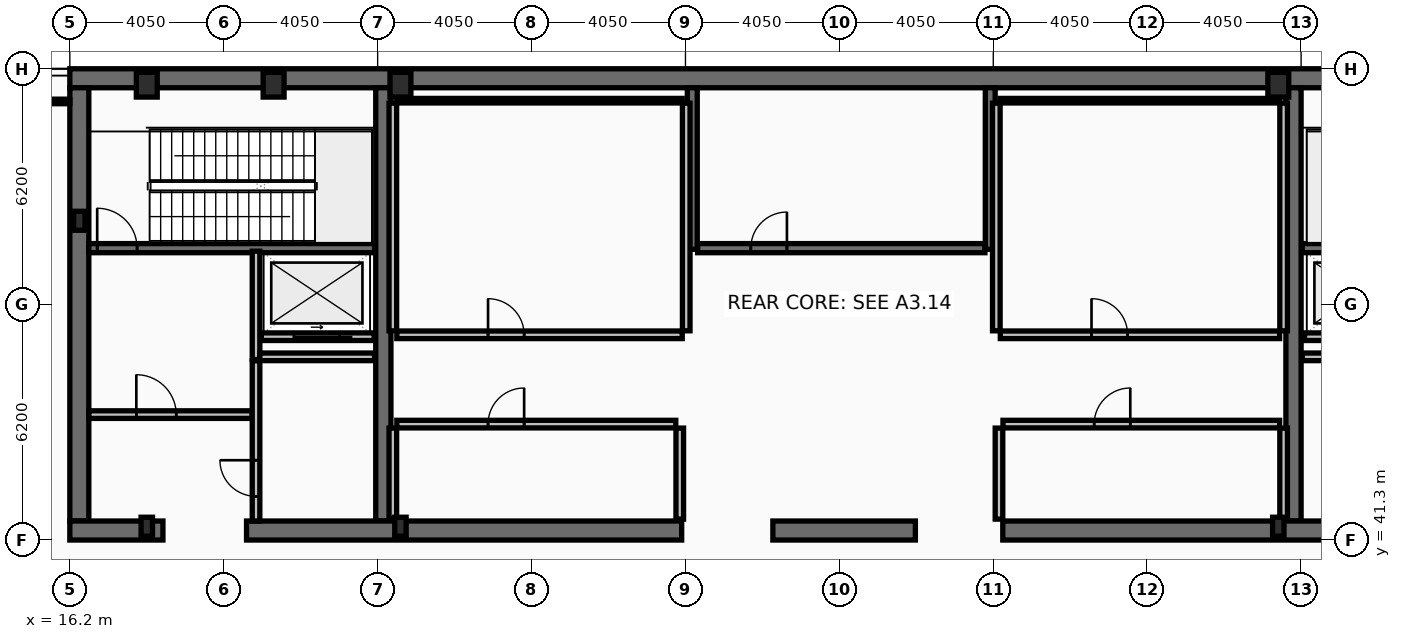
"""IFC4 building model, lengths in metres.
Left out: names, types, materials, properties, quantities, classifications, styles, units other than length and angle.
Written with IfcOpenShell. Run it as: python <this file> out.ifc"""

import sys

from ifc_helpers import new_model, si_unit, direction, frame, frame_2d, origin, origin_2d, place, context, subcontext, project, spatial, rectangle, hollow_rectangle, i_section, extrude, element, fill, save


model = new_model("IFC4")
c1 = context("Model", 3, precision=1e-05, world=origin(), true_north=direction((0.0, 1.0)))
c2 = subcontext(c1, "Body", "Model", "MODEL_VIEW")
j1 = project(units=[si_unit("LENGTHUNIT", "METRE"), si_unit("PLANEANGLEUNIT", "RADIAN")], contexts=[c1])
p1 = place(None, origin())
s1 = spatial("IfcSite", under=j1, at=p1, CompositionType="ELEMENT")
p2 = place(p1, origin())
s2 = spatial("IfcBuilding", under=s1, at=p2, CompositionType="ELEMENT")
p3 = place(p2, frame((0.0, 0.0, 367.4)))
s3 = spatial("IfcBuildingStorey", under=s2, at=p3, CompositionType="ELEMENT", Elevation=367.4)
p4 = place(p3, frame((16.2, 53.45, 0.0), z_axis=(0.0, 0.0, 1.0), x_axis=(1.0, 0.0, 0.0)))
e1 = element("IfcWall", 1, at=p4, inside=s3, PredefinedType="SHEAR", context=c2, shape_type="SweptSolid", body=[
    extrude(rectangle(XDim=40.5, YDim=0.5, at=frame_2d((20.25, 0.0))), origin(), (0.0, 0.0, 1.0), 5.4),
])
p5 = place(p3, frame((16.45, 41.8, 0.0), z_axis=(0.0, 0.0, 1.0), x_axis=(0.0, 1.0, 0.0)))
e2 = element("IfcWall", 2, at=p5, inside=s3, PredefinedType="SHEAR", context=c2, shape_type="SweptSolid", body=[
    extrude(rectangle(XDim=11.4, YDim=0.5, at=frame_2d((5.7, 0.0))), origin(), (0.0, 0.0, 1.0), 5.4),
])
for number, where, z_axis, x_axis in (
    (3, (24.45, 41.8, 0.0), (0.0, 0.0, 1.0), (0.0, 1.0, 0.0)),
    (4, (48.4, 41.8, 0.0), (0.0, 0.0, 1.0), (0.0, 1.0, 0.0)),
):
    element("IfcWall", number, at=place(p3, frame(where, z_axis=z_axis, x_axis=x_axis)), inside=s3, PredefinedType="SHEAR", context=c2, shape_type="SweptSolid", body=[
        extrude(rectangle(XDim=11.4, YDim=0.4, at=frame_2d((5.7, 0.0))), origin(), (0.0, 0.0, 1.0), 5.4),
    ])
p6 = place(p3, frame((18.65, 41.55, 0.0), z_axis=(0.0, 0.0, 1.0), x_axis=(-1.0, 0.0, 0.0)))
e5 = element("IfcWall", 5, at=p6, inside=s3, PredefinedType="SHEAR", context=c2, shape_type="SweptSolid", body=[
    extrude(rectangle(XDim=2.45, YDim=0.5, at=frame_2d((1.225, 0.0))), origin(), (0.0, 0.0, 1.0), 5.4),
])
p7 = place(p3, frame((32.3, 41.55, 0.0), z_axis=(0.0, 0.0, 1.0), x_axis=(-1.0, 0.0, 0.0)))
e6 = element("IfcWall", 6, at=p7, inside=s3, PredefinedType="SHEAR", context=c2, shape_type="SweptSolid", body=[
    extrude(rectangle(XDim=11.45, YDim=0.5, at=frame_2d((5.725, 0.0))), origin(), (0.0, 0.0, 1.0), 5.4),
])
p8 = place(p3, frame((38.45, 41.55, 0.0), z_axis=(0.0, 0.0, 1.0), x_axis=(-1.0, 0.0, 0.0)))
e7 = element("IfcWall", 7, at=p8, inside=s3, PredefinedType="SHEAR", context=c2, shape_type="SweptSolid", body=[
    extrude(rectangle(XDim=3.75, YDim=0.5, at=frame_2d((1.875, 0.0))), origin(), (0.0, 0.0, 1.0), 5.4),
])
p9 = place(p3, frame((52.05, 41.55, 0.0), z_axis=(0.0, 0.0, 1.0), x_axis=(-1.0, 0.0, 0.0)))
e8 = element("IfcWall", 8, at=p9, inside=s3, PredefinedType="SHEAR", context=c2, shape_type="SweptSolid", body=[
    extrude(rectangle(XDim=11.3, YDim=0.5, at=frame_2d((5.65, 0.0))), origin(), (0.0, 0.0, 1.0), 5.4),
])
for number, where, z_axis, x_axis in (
    (9, (32.58, 48.95, 0.0), (0.0, 0.0, 1.0), (0.0, 1.0, 0.0)),
    (10, (40.42, 48.95, 0.0), (0.0, 0.0, 1.0), (0.0, 1.0, 0.0)),
):
    element("IfcWall", number, at=place(p3, frame(where, z_axis=z_axis, x_axis=x_axis)), inside=s3, PredefinedType="SHEAR", context=c2, shape_type="SweptSolid", body=[
        extrude(rectangle(XDim=4.25, YDim=0.26, at=frame_2d((2.125, 0.0))), origin(), (0.0, 0.0, 1.0), 5.4),
    ])
p10 = place(p3, frame((16.7, 48.98, 0.0), z_axis=(0.0, 0.0, 1.0), x_axis=(1.0, 0.0, 0.0)))
e11 = element("IfcWall", 11, at=p10, inside=s3, PredefinedType="SHEAR", context=c2, shape_type="SweptSolid", body=[
    extrude(rectangle(XDim=7.52, YDim=0.24, at=frame_2d((3.76, 0.0))), origin(), (0.0, 0.0, 1.0), 5.4),
])
p11 = place(p10, frame((0.22, 0.0, 0.0)))
e12 = element("IfcOpeningElement", 12, at=p11, cuts=e11, PredefinedType="OPENING", context=c2, shape_type="SweptSolid", body=[
    extrude(rectangle(XDim=1.05, YDim=2.15, at=frame_2d((0.525, 1.075))), frame((0.0, 0.13, 0.0), z_axis=(0.0, -1.0, 0.0), x_axis=(1.0, 0.0, 0.0)), (0.0, 0.0, 1.0), 0.26),
])
p12 = place(p3, frame((48.63, 48.98, 0.0), z_axis=(0.0, 0.0, 1.0), x_axis=(1.0, 0.0, 0.0)))
e13 = element("IfcWall", 13, at=p12, inside=s3, PredefinedType="SHEAR", context=c2, shape_type="SweptSolid", body=[
    extrude(rectangle(XDim=7.57, YDim=0.24, at=frame_2d((3.785, 0.0))), origin(), (0.0, 0.0, 1.0), 5.4),
])
p13 = place(p12, frame((6.3, 0.0, 0.0)))
e14 = element("IfcOpeningElement", 14, at=p13, cuts=e13, PredefinedType="OPENING", context=c2, shape_type="SweptSolid", body=[
    extrude(rectangle(XDim=1.05, YDim=2.15, at=frame_2d((0.525, 1.075))), frame((0.0, 0.13, 0.0), z_axis=(0.0, -1.0, 0.0), x_axis=(1.0, 0.0, 0.0)), (0.0, 0.0, 1.0), 0.26),
])
p14 = place(p3, frame((32.72, 48.98, 0.0), z_axis=(0.0, 0.0, 1.0), x_axis=(1.0, 0.0, 0.0)))
e15 = element("IfcWall", 15, at=p14, inside=s3, PredefinedType="SHEAR", context=c2, shape_type="SweptSolid", body=[
    extrude(rectangle(XDim=7.56, YDim=0.24, at=frame_2d((3.78, 0.0))), origin(), (0.0, 0.0, 1.0), 5.4),
])
p15 = place(p14, frame((1.4, 0.0, 0.0)))
e16 = element("IfcOpeningElement", 16, at=p15, cuts=e15, PredefinedType="OPENING", context=c2, shape_type="SweptSolid", body=[
    extrude(rectangle(XDim=0.95, YDim=2.1, at=frame_2d((0.475, 1.05))), frame((0.0, 0.13, 0.0), z_axis=(0.0, -1.0, 0.0), x_axis=(1.0, 0.0, 0.0)), (0.0, 0.0, 1.0), 0.26),
])
for number, where, z_axis, x_axis in (
    (17, (18.225, 53.28, 0.0), (0.0, 0.0, 1.0), (1.0, 0.0, 0.0)),
    (18, (21.562, 53.28, 0.0), (0.0, 0.0, 1.0), (1.0, 0.0, 0.0)),
    (19, (24.9, 53.28, 0.0), (0.0, 0.0, 1.0), (1.0, 0.0, 0.0)),
    (20, (48.0, 53.28, 0.0), (0.0, 0.0, 1.0), (1.0, 0.0, 0.0)),
):
    element("IfcColumn", number, at=place(p3, frame(where, z_axis=z_axis, x_axis=x_axis)), inside=s3, PredefinedType="COLUMN", context=c2, shape_type="SweptSolid", body=[
        extrude(hollow_rectangle(XDim=0.55, YDim=0.65, WallThickness=0.04, at=origin_2d()), origin(), (0.0, 0.0, 1.0), 5.6),
    ])
for number, where, z_axis, x_axis in (
    (21, (16.45, 49.7, 0.0), (0.0, 0.0, 1.0), (1.0, 0.0, 0.0)),
    (22, (18.225, 41.65, 0.0), (0.0, 0.0, 1.0), (1.0, 0.0, 0.0)),
    (23, (24.9, 41.65, 0.0), (0.0, 0.0, 1.0), (1.0, 0.0, 0.0)),
    (24, (48.0, 41.65, 0.0), (0.0, 0.0, 1.0), (1.0, 0.0, 0.0)),
):
    element("IfcColumn", number, at=place(p3, frame(where, z_axis=z_axis, x_axis=x_axis)), inside=s3, PredefinedType="COLUMN", context=c2, shape_type="SweptSolid", body=[
        extrude(i_section(OverallWidth=0.3, OverallDepth=0.5, WebThickness=0.014, FlangeThickness=0.028, at=origin_2d()), origin(), (0.0, 0.0, 1.0), 5.6),
    ])
p16 = place(p3, frame((51.61, 46.65, 0.0), z_axis=(0.0, 0.0, 1.0), x_axis=(-1.0, 0.0, 0.0)))
e25 = element("IfcWall", 25, at=p16, inside=s3, PredefinedType="PARTITIONING", context=c2, shape_type="SweptSolid", body=[
    extrude(rectangle(XDim=2.92, YDim=0.2, at=frame_2d((1.46, 0.0))), origin(), (0.0, 0.0, 1.0), 5.4),
])
p17 = place(p16, frame((0.86, 0.0, 0.0)))
e26 = element("IfcOpeningElement", 26, at=p17, cuts=e25, PredefinedType="OPENING", context=c2, shape_type="SweptSolid", body=[
    extrude(rectangle(XDim=1.2, YDim=2.18, at=frame_2d((0.6, 1.09))), frame((0.0, 0.11, 0.0), z_axis=(0.0, -1.0, 0.0), x_axis=(1.0, 0.0, 0.0)), (0.0, 0.0, 1.0), 0.22),
])
p18 = place(p3, frame((24.21, 46.65, 0.0), z_axis=(0.0, 0.0, 1.0), x_axis=(-1.0, 0.0, 0.0)))
e27 = element("IfcWall", 27, at=p18, inside=s3, PredefinedType="PARTITIONING", context=c2, shape_type="SweptSolid", body=[
    extrude(rectangle(XDim=2.97, YDim=0.2, at=frame_2d((1.485, 0.0))), origin(), (0.0, 0.0, 1.0), 5.4),
])
p19 = place(p18, frame((0.91, 0.0, 0.0)))
e28 = element("IfcOpeningElement", 28, at=p19, cuts=e27, PredefinedType="OPENING", context=c2, shape_type="SweptSolid", body=[
    extrude(rectangle(XDim=1.2, YDim=2.18, at=frame_2d((0.6, 1.09))), frame((0.0, 0.11, 0.0), z_axis=(0.0, -1.0, 0.0), x_axis=(1.0, 0.0, 0.0)), (0.0, 0.0, 1.0), 0.22),
])
p20 = place(p3, frame((21.1, 46.05, 0.0), z_axis=(0.0, 0.0, 1.0), x_axis=(0.0, 1.0, 0.0)))
e29 = element("IfcWall", 29, at=p20, inside=s3, PredefinedType="PARTITIONING", context=c2, shape_type="SweptSolid", body=[
    extrude(rectangle(XDim=2.85, YDim=0.2, at=frame_2d((1.425, 0.0))), origin(), (0.0, 0.0, 1.0), 5.4),
])
p21 = place(p3, frame((16.7, 44.6, 0.0), z_axis=(0.0, 0.0, 1.0), x_axis=(1.0, 0.0, 0.0)))
e30 = element("IfcWall", 30, at=p21, inside=s3, PredefinedType="PARTITIONING", context=c2, shape_type="SweptSolid", body=[
    extrude(rectangle(XDim=4.3, YDim=0.2, at=frame_2d((2.15, 0.0))), origin(), (0.0, 0.0, 1.0), 5.4),
])
p22 = place(p21, frame((1.25, 0.0, 0.0)))
e31 = element("IfcOpeningElement", 31, at=p22, cuts=e30, PredefinedType="OPENING", context=c2, shape_type="SweptSolid", body=[
    extrude(rectangle(XDim=1.05, YDim=2.15, at=frame_2d((0.525, 1.075))), frame((0.0, 0.11, 0.0), z_axis=(0.0, -1.0, 0.0), x_axis=(1.0, 0.0, 0.0)), (0.0, 0.0, 1.0), 0.22),
])
p23 = place(p3, frame((21.2, 46.12, 0.0), z_axis=(0.0, 0.0, 1.0), x_axis=(1.0, 0.0, 0.0)))
e32 = element("IfcWall", 32, at=p23, inside=s3, PredefinedType="PARTITIONING", context=c2, shape_type="SweptSolid", body=[
    extrude(rectangle(XDim=3.02, YDim=0.2, at=frame_2d((1.51, 0.0))), origin(), (0.0, 0.0, 1.0), 5.4),
])
p24 = place(p3, frame((21.1, 41.8, 0.0), z_axis=(0.0, 0.0, 1.0), x_axis=(0.0, 1.0, 0.0)))
e33 = element("IfcWall", 33, at=p24, inside=s3, PredefinedType="PARTITIONING", context=c2, shape_type="SweptSolid", body=[
    extrude(rectangle(XDim=4.215, YDim=0.2, at=frame_2d((2.107, 0.0))), origin(), (0.0, 0.0, 1.0), 5.4),
])
p25 = place(p24, frame((0.65, 0.0, 0.0)))
e34 = element("IfcOpeningElement", 34, at=p25, cuts=e33, PredefinedType="OPENING", context=c2, shape_type="SweptSolid", body=[
    extrude(rectangle(XDim=0.95, YDim=2.1, at=frame_2d((0.475, 1.05))), frame((0.0, 0.11, 0.0), z_axis=(0.0, -1.0, 0.0), x_axis=(1.0, 0.0, 0.0)), (0.0, 0.0, 1.0), 0.22),
])
p26 = place(p3, frame((48.63, 46.12, 0.0), z_axis=(0.0, 0.0, 1.0), x_axis=(1.0, 0.0, 0.0)))
e35 = element("IfcWall", 35, at=p26, inside=s3, PredefinedType="PARTITIONING", context=c2, shape_type="SweptSolid", body=[
    extrude(rectangle(XDim=3.07, YDim=0.2, at=frame_2d((1.535, 0.0))), origin(), (0.0, 0.0, 1.0), 5.4),
])
for number, where, z_axis, x_axis in (
    (36, (24.7, 46.805, 0.0), (0.0, 0.0, 1.0), (0.0, 1.0, 0.0)),
    (37, (32.42, 46.805, 0.0), (0.0, 0.0, 1.0), (0.0, 1.0, 0.0)),
):
    element("IfcWall", number, at=place(p3, frame(where, z_axis=z_axis, x_axis=x_axis)), inside=s3, PredefinedType="PARTITIONING", context=c2, shape_type="SweptSolid", body=[
        extrude(rectangle(XDim=5.99, YDim=0.2, at=frame_2d((2.995, 0.0))), origin(), (0.0, 0.0, 1.0), 5.4),
    ])
p27 = place(p3, frame((24.805, 52.86, 0.0), z_axis=(0.0, 0.0, 1.0), x_axis=(1.0, 0.0, 0.0)))
e38 = element("IfcWall", 38, at=p27, inside=s3, PredefinedType="PARTITIONING", context=c2, shape_type="SweptSolid", body=[
    extrude(rectangle(XDim=7.51, YDim=0.12, at=frame_2d((3.755, 0.0))), origin(), (0.0, 0.0, 1.0), 5.4),
])
p28 = place(p3, frame((24.805, 46.7, 0.0), z_axis=(0.0, 0.0, 1.0), x_axis=(1.0, 0.0, 0.0)))
e39 = element("IfcWall", 39, at=p28, inside=s3, PredefinedType="PARTITIONING", context=c2, shape_type="SweptSolid", body=[
    extrude(rectangle(XDim=7.51, YDim=0.2, at=frame_2d((3.755, 0.0))), origin(), (0.0, 0.0, 1.0), 5.4),
])
p29 = place(p28, frame((2.4, 0.0, 0.0)))
e40 = element("IfcOpeningElement", 40, at=p29, cuts=e39, PredefinedType="OPENING", context=c2, shape_type="SweptSolid", body=[
    extrude(rectangle(XDim=0.95, YDim=2.1, at=frame_2d((0.475, 1.05))), frame((0.0, 0.11, 0.0), z_axis=(0.0, -1.0, 0.0), x_axis=(1.0, 0.0, 0.0)), (0.0, 0.0, 1.0), 0.22),
])
for number, where, z_axis, x_axis in (
    (41, (24.7, 41.85, 0.0), (0.0, 0.0, 1.0), (0.0, 1.0, 0.0)),
    (42, (32.25, 41.85, 0.0), (0.0, 0.0, 1.0), (0.0, 1.0, 0.0)),
):
    element("IfcWall", number, at=place(p3, frame(where, z_axis=z_axis, x_axis=x_axis)), inside=s3, PredefinedType="PARTITIONING", context=c2, shape_type="SweptSolid", body=[
        extrude(rectangle(XDim=2.395, YDim=0.2, at=frame_2d((1.198, 0.0))), origin(), (0.0, 0.0, 1.0), 5.4),
    ])
p30 = place(p3, frame((24.805, 44.35, 0.0), z_axis=(0.0, 0.0, 1.0), x_axis=(1.0, 0.0, 0.0)))
e43 = element("IfcWall", 43, at=p30, inside=s3, PredefinedType="PARTITIONING", context=c2, shape_type="SweptSolid", body=[
    extrude(rectangle(XDim=7.34, YDim=0.2, at=frame_2d((3.67, 0.0))), origin(), (0.0, 0.0, 1.0), 5.4),
])
p31 = place(p30, frame((2.4, 0.0, 0.0)))
e44 = element("IfcOpeningElement", 44, at=p31, cuts=e43, PredefinedType="OPENING", context=c2, shape_type="SweptSolid", body=[
    extrude(rectangle(XDim=0.95, YDim=2.1, at=frame_2d((0.475, 1.05))), frame((0.0, 0.11, 0.0), z_axis=(0.0, -1.0, 0.0), x_axis=(1.0, 0.0, 0.0)), (0.0, 0.0, 1.0), 0.22),
])
for number, where, z_axis, x_axis in (
    (45, (40.58, 46.805, 0.0), (0.0, 0.0, 1.0), (0.0, 1.0, 0.0)),
    (46, (48.14, 46.805, 0.0), (0.0, 0.0, 1.0), (0.0, 1.0, 0.0)),
):
    element("IfcWall", number, at=place(p3, frame(where, z_axis=z_axis, x_axis=x_axis)), inside=s3, PredefinedType="PARTITIONING", context=c2, shape_type="SweptSolid", body=[
        extrude(rectangle(XDim=5.99, YDim=0.2, at=frame_2d((2.995, 0.0))), origin(), (0.0, 0.0, 1.0), 5.4),
    ])
p32 = place(p3, frame((40.685, 52.86, 0.0), z_axis=(0.0, 0.0, 1.0), x_axis=(1.0, 0.0, 0.0)))
e47 = element("IfcWall", 47, at=p32, inside=s3, PredefinedType="PARTITIONING", context=c2, shape_type="SweptSolid", body=[
    extrude(rectangle(XDim=7.35, YDim=0.12, at=frame_2d((3.675, 0.0))), origin(), (0.0, 0.0, 1.0), 5.4),
])
p33 = place(p3, frame((40.685, 46.7, 0.0), z_axis=(0.0, 0.0, 1.0), x_axis=(1.0, 0.0, 0.0)))
e48 = element("IfcWall", 48, at=p33, inside=s3, PredefinedType="PARTITIONING", context=c2, shape_type="SweptSolid", body=[
    extrude(rectangle(XDim=7.35, YDim=0.2, at=frame_2d((3.675, 0.0))), origin(), (0.0, 0.0, 1.0), 5.4),
])
p34 = place(p33, frame((2.4, 0.0, 0.0)))
e49 = element("IfcOpeningElement", 49, at=p34, cuts=e48, PredefinedType="OPENING", context=c2, shape_type="SweptSolid", body=[
    extrude(rectangle(XDim=0.95, YDim=2.1, at=frame_2d((0.475, 1.05))), frame((0.0, 0.11, 0.0), z_axis=(0.0, -1.0, 0.0), x_axis=(1.0, 0.0, 0.0)), (0.0, 0.0, 1.0), 0.22),
])
for number, where, z_axis, x_axis in (
    (50, (40.65, 41.85, 0.0), (0.0, 0.0, 1.0), (0.0, 1.0, 0.0)),
    (51, (48.14, 41.85, 0.0), (0.0, 0.0, 1.0), (0.0, 1.0, 0.0)),
):
    element("IfcWall", number, at=place(p3, frame(where, z_axis=z_axis, x_axis=x_axis)), inside=s3, PredefinedType="PARTITIONING", context=c2, shape_type="SweptSolid", body=[
        extrude(rectangle(XDim=2.395, YDim=0.2, at=frame_2d((1.198, 0.0))), origin(), (0.0, 0.0, 1.0), 5.4),
    ])
p35 = place(p3, frame((40.755, 44.35, 0.0), z_axis=(0.0, 0.0, 1.0), x_axis=(1.0, 0.0, 0.0)))
e52 = element("IfcWall", 52, at=p35, inside=s3, PredefinedType="PARTITIONING", context=c2, shape_type="SweptSolid", body=[
    extrude(rectangle(XDim=7.28, YDim=0.2, at=frame_2d((3.64, 0.0))), origin(), (0.0, 0.0, 1.0), 5.4),
])
p36 = place(p35, frame((2.4, 0.0, 0.0)))
e53 = element("IfcOpeningElement", 53, at=p36, cuts=e52, PredefinedType="OPENING", context=c2, shape_type="SweptSolid", body=[
    extrude(rectangle(XDim=0.95, YDim=2.1, at=frame_2d((0.475, 1.05))), frame((0.0, 0.11, 0.0), z_axis=(0.0, -1.0, 0.0), x_axis=(1.0, 0.0, 0.0)), (0.0, 0.0, 1.0), 0.22),
])
p37 = place(p3, frame((12.095, 52.84, 0.0), z_axis=(0.0, 0.0, 1.0), x_axis=(1.0, 0.0, 0.0)))
e54 = element("IfcWall", 54, at=p37, inside=s3, PredefinedType="PARTITIONING", context=c2, shape_type="SweptSolid", body=[
    extrude(rectangle(XDim=4.105, YDim=0.12, at=frame_2d((2.052, 0.0))), origin(), (0.0, 0.0, 1.0), 5.4),
])
p38 = place(p11, origin())
e55 = element("IfcDoor", 55, at=p38, inside=s3, OperationType="SINGLE_SWING_LEFT", PredefinedType="DOOR", context=c2, shape_type="SweptSolid", body=[
    extrude(rectangle(XDim=1.05, YDim=2.15, at=frame_2d((0.525, 1.075))), frame((0.0, 0.025, 0.0), z_axis=(0.0, -1.0, 0.0), x_axis=(1.0, 0.0, 0.0)), (0.0, 0.0, 1.0), 0.05),
])
fill(e12, e55)
p39 = place(p15, origin())
e56 = element("IfcDoor", 56, at=p39, inside=s3, OperationType="SINGLE_SWING_RIGHT", PredefinedType="DOOR", context=c2, shape_type="SweptSolid", body=[
    extrude(rectangle(XDim=0.95, YDim=2.1, at=frame_2d((0.475, 1.05))), frame((0.0, 0.025, 0.0), z_axis=(0.0, -1.0, 0.0), x_axis=(1.0, 0.0, 0.0)), (0.0, 0.0, 1.0), 0.05),
])
fill(e16, e56)
p40 = place(p19, origin())
e57 = element("IfcDoor", 57, at=p40, inside=s3, OperationType="SLIDING_TO_LEFT", PredefinedType="DOOR", context=c2, shape_type="SweptSolid", body=[
    extrude(rectangle(XDim=1.2, YDim=2.18, at=frame_2d((0.6, 1.09))), frame((0.0, 0.025, 0.0), z_axis=(0.0, -1.0, 0.0), x_axis=(1.0, 0.0, 0.0)), (0.0, 0.0, 1.0), 0.05),
])
fill(e28, e57)
p41 = place(p22, origin())
e58 = element("IfcDoor", 58, at=p41, inside=s3, OperationType="SINGLE_SWING_LEFT", PredefinedType="DOOR", context=c2, shape_type="SweptSolid", body=[
    extrude(rectangle(XDim=1.05, YDim=2.15, at=frame_2d((0.525, 1.075))), frame((0.0, 0.025, 0.0), z_axis=(0.0, -1.0, 0.0), x_axis=(1.0, 0.0, 0.0)), (0.0, 0.0, 1.0), 0.05),
])
fill(e31, e58)
p42 = place(p25, origin())
e59 = element("IfcDoor", 59, at=p42, inside=s3, OperationType="SINGLE_SWING_RIGHT", PredefinedType="DOOR", context=c2, shape_type="SweptSolid", body=[
    extrude(rectangle(XDim=0.95, YDim=2.1, at=frame_2d((0.475, 1.05))), frame((0.0, 0.025, 0.0), z_axis=(0.0, -1.0, 0.0), x_axis=(1.0, 0.0, 0.0)), (0.0, 0.0, 1.0), 0.05),
])
fill(e34, e59)
p43 = place(p29, origin())
e60 = element("IfcDoor", 60, at=p43, inside=s3, OperationType="SINGLE_SWING_LEFT", PredefinedType="DOOR", context=c2, shape_type="SweptSolid", body=[
    extrude(rectangle(XDim=0.95, YDim=2.1, at=frame_2d((0.475, 1.05))), frame((0.0, 0.025, 0.0), z_axis=(0.0, -1.0, 0.0), x_axis=(1.0, 0.0, 0.0)), (0.0, 0.0, 1.0), 0.05),
])
fill(e40, e60)
p44 = place(p31, origin())
e61 = element("IfcDoor", 61, at=p44, inside=s3, OperationType="SINGLE_SWING_RIGHT", PredefinedType="DOOR", context=c2, shape_type="SweptSolid", body=[
    extrude(rectangle(XDim=0.95, YDim=2.1, at=frame_2d((0.475, 1.05))), frame((0.0, 0.025, 0.0), z_axis=(0.0, -1.0, 0.0), x_axis=(1.0, 0.0, 0.0)), (0.0, 0.0, 1.0), 0.05),
])
fill(e44, e61)
p45 = place(p34, origin())
e62 = element("IfcDoor", 62, at=p45, inside=s3, OperationType="SINGLE_SWING_LEFT", PredefinedType="DOOR", context=c2, shape_type="SweptSolid", body=[
    extrude(rectangle(XDim=0.95, YDim=2.1, at=frame_2d((0.475, 1.05))), frame((0.0, 0.025, 0.0), z_axis=(0.0, -1.0, 0.0), x_axis=(1.0, 0.0, 0.0)), (0.0, 0.0, 1.0), 0.05),
])
fill(e49, e62)
p46 = place(p36, origin())
e63 = element("IfcDoor", 63, at=p46, inside=s3, OperationType="SINGLE_SWING_RIGHT", PredefinedType="DOOR", context=c2, shape_type="SweptSolid", body=[
    extrude(rectangle(XDim=0.95, YDim=2.1, at=frame_2d((0.475, 1.05))), frame((0.0, 0.025, 0.0), z_axis=(0.0, -1.0, 0.0), x_axis=(1.0, 0.0, 0.0)), (0.0, 0.0, 1.0), 0.05),
])
fill(e53, e63)
save(model, sys.argv[1])
